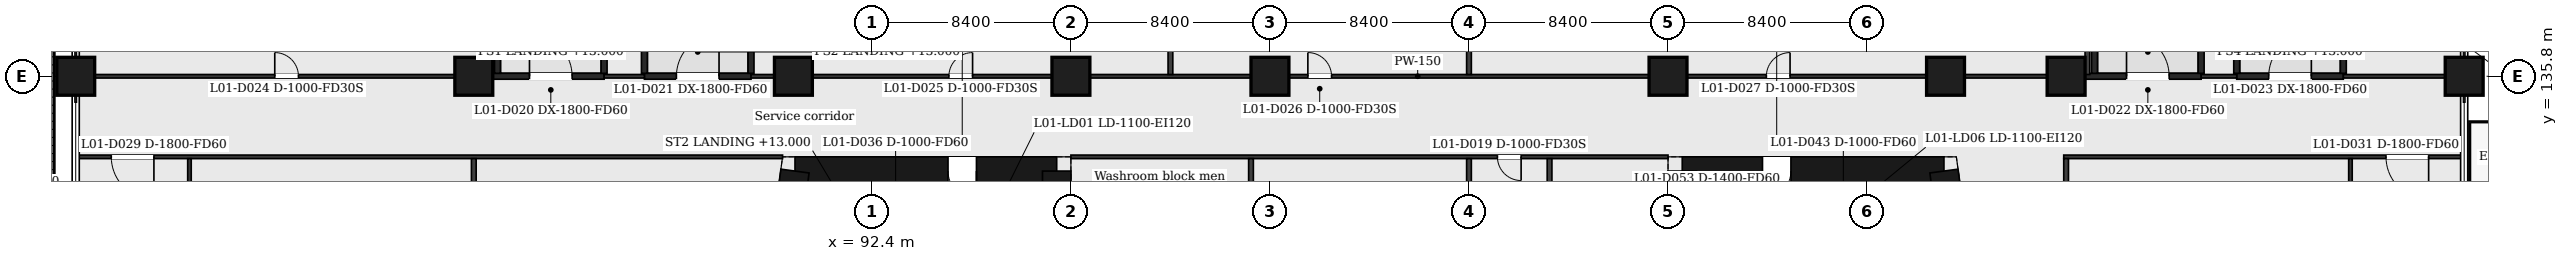
"""IFC4 building model, lengths in metres.
Left out: names, types, materials, properties, quantities, classifications, styles, units other than length and angle.
Written with IfcOpenShell. Run it as: python <this file> out.ifc"""

import sys

from ifc_helpers import new_model, si_unit, direction, frame, frame_2d, origin, origin_2d, place, context, subcontext, project, spatial, rectangle, extrude, element, fill, save


model = new_model("IFC4")
c1 = context("Model", 3, precision=1e-05, world=origin(), true_north=direction((0.0, 1.0)))
c2 = subcontext(c1, "Body", "Model", "MODEL_VIEW")
j1 = project(units=[si_unit("LENGTHUNIT", "METRE"), si_unit("PLANEANGLEUNIT", "RADIAN")], contexts=[c1])
p1 = place(None, origin())
s1 = spatial("IfcSite", under=j1, at=p1, CompositionType="ELEMENT")
p2 = place(p1, origin())
s2 = spatial("IfcBuilding", under=s1, at=p2, CompositionType="ELEMENT")
p3 = place(p2, frame((0.0, 0.0, 9.0)))
s3 = spatial("IfcBuildingStorey", under=s2, at=p3, CompositionType="ELEMENT", Elevation=9.0)
p4 = place(p3, frame((89.156, 131.8, 0.0), z_axis=(0.0, 0.0, 1.0), x_axis=(1.0, 0.0, 0.0)))
e1 = element("IfcWall", 1, at=p4, inside=s3, PredefinedType="SHEAR", context=c2, shape_type="SweptSolid", body=[
    extrude(rectangle(XDim=11.044, YDim=1.2, at=frame_2d((5.522, 0.0))), origin(), (0.0, 0.0, 1.0), 8.0),
])
p5 = place(p4, frame((6.458, 0.0, 0.0)))
e2 = element("IfcOpeningElement", 2, at=p5, cuts=e1, PredefinedType="OPENING", context=c2, shape_type="SweptSolid", body=[
    extrude(rectangle(XDim=1.2, YDim=2.1, at=frame_2d((0.6, 1.05))), frame((0.0, 0.61, 0.0), z_axis=(0.0, -1.0, 0.0), x_axis=(1.0, 0.0, 0.0)), (0.0, 0.0, 1.0), 1.22),
])
p6 = place(p3, frame((100.2, 131.8, 0.0), z_axis=(0.0, 0.0, 1.0), x_axis=(0.0, -1.0, 0.0)))
e3 = element("IfcWall", 3, at=p6, inside=s3, PredefinedType="SHEAR", context=c2, shape_type="SweptSolid", body=[
    extrude(rectangle(XDim=20.8, YDim=1.2, at=frame_2d((10.4, 0.0))), origin(), (0.0, 0.0, 1.0), 8.0),
])
p7 = place(p6, frame((7.65, 0.0, 0.0)))
e4 = element("IfcOpeningElement", 4, at=p7, cuts=e3, PredefinedType="OPENING", context=c2, shape_type="SweptSolid", body=[
    extrude(rectangle(XDim=1.4, YDim=2.1, at=frame_2d((0.7, 1.05))), frame((0.0, 0.61, 0.0), z_axis=(0.0, -1.0, 0.0), x_axis=(1.0, 0.0, 0.0)), (0.0, 0.0, 1.0), 1.22),
])
p8 = place(p3, frame((86.355, 111.0, 0.0), z_axis=(0.0, 0.0, 1.0), x_axis=(0.133413989637, 0.99106039542, 0.0)))
e5 = element("IfcWall", 5, at=p8, inside=s3, PredefinedType="SHEAR", context=c2, shape_type="SweptSolid", body=[
    extrude(rectangle(XDim=20.988, YDim=1.2, at=frame_2d((10.494, 0.0))), origin(), (0.0, 0.0, 1.0), 8.0),
])
p9 = place(p3, frame((126.6, 131.8, 0.0), z_axis=(0.0, 0.0, 1.0), x_axis=(1.0, 0.0, 0.0)))
e6 = element("IfcWall", 6, at=p9, inside=s3, PredefinedType="SHEAR", context=c2, shape_type="SweptSolid", body=[
    extrude(rectangle(XDim=11.044, YDim=1.2, at=frame_2d((5.522, 0.0))), origin(), (0.0, 0.0, 1.0), 8.0),
])
p10 = place(p9, frame((3.386, 0.0, 0.0)))
e7 = element("IfcOpeningElement", 7, at=p10, cuts=e6, PredefinedType="OPENING", context=c2, shape_type="SweptSolid", body=[
    extrude(rectangle(XDim=1.2, YDim=2.1, at=frame_2d((0.6, 1.05))), frame((0.0, 0.61, 0.0), z_axis=(0.0, -1.0, 0.0), x_axis=(1.0, 0.0, 0.0)), (0.0, 0.0, 1.0), 1.22),
])
p11 = place(p3, frame((137.645, 131.8, 0.0), z_axis=(0.0, 0.0, 1.0), x_axis=(0.133413989637, -0.99106039542, 0.0)))
e8 = element("IfcWall", 8, at=p11, inside=s3, PredefinedType="SHEAR", context=c2, shape_type="SweptSolid", body=[
    extrude(rectangle(XDim=20.988, YDim=1.2, at=frame_2d((10.494, 0.0))), origin(), (0.0, 0.0, 1.0), 8.0),
])
p12 = place(p3, frame((126.6, 111.0, 0.0), z_axis=(0.0, 0.0, 1.0), x_axis=(0.0, 1.0, 0.0)))
e9 = element("IfcWall", 9, at=p12, inside=s3, PredefinedType="SHEAR", context=c2, shape_type="SweptSolid", body=[
    extrude(rectangle(XDim=20.8, YDim=1.2, at=frame_2d((10.4, 0.0))), origin(), (0.0, 0.0, 1.0), 8.0),
])
p13 = place(p12, frame((11.75, 0.0, 0.0)))
e10 = element("IfcOpeningElement", 10, at=p13, cuts=e9, PredefinedType="OPENING", context=c2, shape_type="SweptSolid", body=[
    extrude(rectangle(XDim=1.4, YDim=2.1, at=frame_2d((0.7, 1.05))), frame((0.0, 0.61, 0.0), z_axis=(0.0, -1.0, 0.0), x_axis=(1.0, 0.0, 0.0)), (0.0, 0.0, 1.0), 1.22),
])
for number, where, z_axis, x_axis in (
    (11, (58.8, 135.8, 0.0), (0.0, 0.0, 1.0), (1.0, 0.0, 0.0)),
    (12, (75.6, 135.8, 0.0), (0.0, 0.0, 1.0), (1.0, 0.0, 0.0)),
    (13, (89.088, 135.8, 0.0), (0.0, 0.0, 1.0), (1.0, 0.0, 0.0)),
    (14, (100.8, 135.8, 0.0), (0.0, 0.0, 1.0), (1.0, 0.0, 0.0)),
    (15, (109.2, 135.8, 0.0), (0.0, 0.0, 1.0), (1.0, 0.0, 0.0)),
    (16, (126.0, 135.8, 0.0), (0.0, 0.0, 1.0), (1.0, 0.0, 0.0)),
    (17, (137.711, 135.8, 0.0), (0.0, 0.0, 1.0), (1.0, 0.0, 0.0)),
    (18, (142.8, 135.8, 0.0), (0.0, 0.0, 1.0), (1.0, 0.0, 0.0)),
    (19, (159.6, 135.8, 0.0), (0.0, 0.0, 1.0), (1.0, 0.0, 0.0)),
):
    element("IfcColumn", number, at=place(p3, frame(where, z_axis=z_axis, x_axis=x_axis)), inside=s3, PredefinedType="COLUMN", context=c2, shape_type="SweptSolid", body=[
        extrude(rectangle(XDim=1.6, YDim=1.6, at=origin_2d()), origin(), (0.0, 0.0, 1.0), 8.0),
    ])
p14 = place(p3, frame((58.85, 132.4, 0.0), z_axis=(0.0, 0.0, 1.0), x_axis=(1.0, 0.0, 0.0)))
e20 = element("IfcWall", 20, at=p14, inside=s3, PredefinedType="PARTITIONING", context=c2, shape_type="SweptSolid", body=[
    extrude(rectangle(XDim=29.781, YDim=0.15, at=frame_2d((14.891, 0.0))), origin(), (0.0, 0.0, 1.0), 7.5),
])
p15 = place(p14, frame((1.45, 0.0, 0.0)))
e21 = element("IfcOpeningElement", 21, at=p15, cuts=e20, PredefinedType="OPENING", context=c2, shape_type="SweptSolid", body=[
    extrude(rectangle(XDim=1.8, YDim=2.1, at=frame_2d((0.9, 1.05))), frame((0.0, 0.085, 0.0), z_axis=(0.0, -1.0, 0.0), x_axis=(1.0, 0.0, 0.0)), (0.0, 0.0, 1.0), 0.17),
])
p16 = place(p3, frame((100.8, 132.4, 0.0), z_axis=(0.0, 0.0, 1.0), x_axis=(1.0, 0.0, 0.0)))
e22 = element("IfcWall", 22, at=p16, inside=s3, PredefinedType="PARTITIONING", context=c2, shape_type="SweptSolid", body=[
    extrude(rectangle(XDim=25.2, YDim=0.15, at=frame_2d((12.6, 0.0))), origin(), (0.0, 0.0, 1.0), 7.5),
])
p17 = place(p16, frame((18.0, 0.0, 0.0)))
e23 = element("IfcOpeningElement", 23, at=p17, cuts=e22, PredefinedType="OPENING", context=c2, shape_type="SweptSolid", body=[
    extrude(rectangle(XDim=1.0, YDim=2.1, at=frame_2d((0.5, 1.05))), frame((0.0, 0.085, 0.0), z_axis=(0.0, -1.0, 0.0), x_axis=(1.0, 0.0, 0.0)), (0.0, 0.0, 1.0), 0.17),
])
p18 = place(p3, frame((142.7, 132.4, 0.0), z_axis=(0.0, 0.0, 1.0), x_axis=(1.0, 0.0, 0.0)))
e24 = element("IfcWall", 24, at=p18, inside=s3, PredefinedType="PARTITIONING", context=c2, shape_type="SweptSolid", body=[
    extrude(rectangle(XDim=16.85, YDim=0.15, at=frame_2d((8.425, 0.0))), origin(), (0.0, 0.0, 1.0), 7.5),
])
p19 = place(p18, frame((13.6, 0.0, 0.0)))
e25 = element("IfcOpeningElement", 25, at=p19, cuts=e24, PredefinedType="OPENING", context=c2, shape_type="SweptSolid", body=[
    extrude(rectangle(XDim=1.8, YDim=2.1, at=frame_2d((0.9, 1.05))), frame((0.0, 0.085, 0.0), z_axis=(0.0, -1.0, 0.0), x_axis=(1.0, 0.0, 0.0)), (0.0, 0.0, 1.0), 0.17),
])
p20 = place(p3, frame((76.37, 135.8, 0.0), z_axis=(0.0, 0.0, 1.0), x_axis=(1.0, 0.0, 0.0)))
e26 = element("IfcWall", 26, at=p20, inside=s3, PredefinedType="PARTITIONING", context=c2, shape_type="SweptSolid", body=[
    extrude(rectangle(XDim=4.73, YDim=0.25, at=frame_2d((2.365, 0.0))), origin(), (0.0, 0.0, 1.0), 7.5),
])
p21 = place(p20, frame((1.58, 0.0, 0.0)))
e27 = element("IfcOpeningElement", 27, at=p21, cuts=e26, PredefinedType="OPENING", context=c2, shape_type="SweptSolid", body=[
    extrude(rectangle(XDim=1.8, YDim=2.1, at=frame_2d((0.9, 1.05))), frame((0.0, 0.135, 0.0), z_axis=(0.0, -1.0, 0.0), x_axis=(1.0, 0.0, 0.0)), (0.0, 0.0, 1.0), 0.27),
])
p22 = place(p3, frame((82.8, 135.8, 0.0), z_axis=(0.0, 0.0, 1.0), x_axis=(1.0, 0.0, 0.0)))
e28 = element("IfcWall", 28, at=p22, inside=s3, PredefinedType="PARTITIONING", context=c2, shape_type="SweptSolid", body=[
    extrude(rectangle(XDim=4.5, YDim=0.25, at=frame_2d((2.25, 0.0))), origin(), (0.0, 0.0, 1.0), 7.5),
])
p23 = place(p22, frame((1.35, 0.0, 0.0)))
e29 = element("IfcOpeningElement", 29, at=p23, cuts=e28, PredefinedType="OPENING", context=c2, shape_type="SweptSolid", body=[
    extrude(rectangle(XDim=1.8, YDim=2.1, at=frame_2d((0.9, 1.05))), frame((0.0, 0.135, 0.0), z_axis=(0.0, -1.0, 0.0), x_axis=(1.0, 0.0, 0.0)), (0.0, 0.0, 1.0), 0.27),
])
p24 = place(p3, frame((143.57, 135.8, 0.0), z_axis=(0.0, 0.0, 1.0), x_axis=(1.0, 0.0, 0.0)))
e30 = element("IfcWall", 30, at=p24, inside=s3, PredefinedType="PARTITIONING", context=c2, shape_type="SweptSolid", body=[
    extrude(rectangle(XDim=4.93, YDim=0.25, at=frame_2d((2.465, 0.0))), origin(), (0.0, 0.0, 1.0), 7.5),
])
p25 = place(p24, frame((1.78, 0.0, 0.0)))
e31 = element("IfcOpeningElement", 31, at=p25, cuts=e30, PredefinedType="OPENING", context=c2, shape_type="SweptSolid", body=[
    extrude(rectangle(XDim=1.8, YDim=2.1, at=frame_2d((0.9, 1.05))), frame((0.0, 0.135, 0.0), z_axis=(0.0, -1.0, 0.0), x_axis=(1.0, 0.0, 0.0)), (0.0, 0.0, 1.0), 0.27),
])
p26 = place(p3, frame((150.0, 135.8, 0.0), z_axis=(0.0, 0.0, 1.0), x_axis=(1.0, 0.0, 0.0)))
e32 = element("IfcWall", 32, at=p26, inside=s3, PredefinedType="PARTITIONING", context=c2, shape_type="SweptSolid", body=[
    extrude(rectangle(XDim=4.5, YDim=0.25, at=frame_2d((2.25, 0.0))), origin(), (0.0, 0.0, 1.0), 7.5),
])
p27 = place(p26, frame((1.35, 0.0, 0.0)))
e33 = element("IfcOpeningElement", 33, at=p27, cuts=e32, PredefinedType="OPENING", context=c2, shape_type="SweptSolid", body=[
    extrude(rectangle(XDim=1.8, YDim=2.1, at=frame_2d((0.9, 1.05))), frame((0.0, 0.135, 0.0), z_axis=(0.0, -1.0, 0.0), x_axis=(1.0, 0.0, 0.0)), (0.0, 0.0, 1.0), 0.27),
])
p28 = place(p3, frame((58.85, 135.8, 0.0), z_axis=(0.0, 0.0, 1.0), x_axis=(1.0, 0.0, 0.0)))
e34 = element("IfcWall", 34, at=p28, inside=s3, PredefinedType="PARTITIONING", context=c2, shape_type="SweptSolid", body=[
    extrude(rectangle(XDim=17.52, YDim=0.15, at=frame_2d((8.76, 0.0))), origin(), (0.0, 0.0, 1.0), 7.5),
])
p29 = place(p28, frame((8.35, 0.0, 0.0)))
e35 = element("IfcOpeningElement", 35, at=p29, cuts=e34, PredefinedType="OPENING", context=c2, shape_type="SweptSolid", body=[
    extrude(rectangle(XDim=1.0, YDim=2.1, at=frame_2d((0.5, 1.05))), frame((0.0, 0.085, 0.0), z_axis=(0.0, -1.0, 0.0), x_axis=(1.0, 0.0, 0.0)), (0.0, 0.0, 1.0), 0.17),
])
p30 = place(p3, frame((81.1, 135.8, 0.0), z_axis=(0.0, 0.0, 1.0), x_axis=(1.0, 0.0, 0.0)))
e36 = element("IfcWall", 36, at=p30, inside=s3, PredefinedType="PARTITIONING", context=c2, shape_type="SweptSolid", body=[
    extrude(rectangle(XDim=1.7, YDim=0.15, at=frame_2d((0.85, 0.0))), origin(), (0.0, 0.0, 1.0), 7.5),
])
p31 = place(p3, frame((87.3, 135.8, 0.0), z_axis=(0.0, 0.0, 1.0), x_axis=(1.0, 0.0, 0.0)))
e37 = element("IfcWall", 37, at=p31, inside=s3, PredefinedType="PARTITIONING", context=c2, shape_type="SweptSolid", body=[
    extrude(rectangle(XDim=56.27, YDim=0.15, at=frame_2d((28.135, 0.0))), origin(), (0.0, 0.0, 1.0), 7.5),
])
p32 = place(p31, frame((8.35, 0.0, 0.0)))
e38 = element("IfcOpeningElement", 38, at=p32, cuts=e37, PredefinedType="OPENING", context=c2, shape_type="SweptSolid", body=[
    extrude(rectangle(XDim=1.0, YDim=2.1, at=frame_2d((0.5, 1.05))), frame((0.0, 0.085, 0.0), z_axis=(0.0, -1.0, 0.0), x_axis=(1.0, 0.0, 0.0)), (0.0, 0.0, 1.0), 0.17),
])
p33 = place(p31, frame((23.5, 0.0, 0.0)))
e39 = element("IfcOpeningElement", 39, at=p33, cuts=e37, PredefinedType="OPENING", context=c2, shape_type="SweptSolid", body=[
    extrude(rectangle(XDim=1.0, YDim=2.1, at=frame_2d((0.5, 1.05))), frame((0.0, 0.085, 0.0), z_axis=(0.0, -1.0, 0.0), x_axis=(1.0, 0.0, 0.0)), (0.0, 0.0, 1.0), 0.17),
])
p34 = place(p31, frame((42.85, 0.0, 0.0)))
e40 = element("IfcOpeningElement", 40, at=p34, cuts=e37, PredefinedType="OPENING", context=c2, shape_type="SweptSolid", body=[
    extrude(rectangle(XDim=1.0, YDim=2.1, at=frame_2d((0.5, 1.05))), frame((0.0, 0.085, 0.0), z_axis=(0.0, -1.0, 0.0), x_axis=(1.0, 0.0, 0.0)), (0.0, 0.0, 1.0), 0.17),
])
p35 = place(p3, frame((148.5, 135.8, 0.0), z_axis=(0.0, 0.0, 1.0), x_axis=(1.0, 0.0, 0.0)))
e41 = element("IfcWall", 41, at=p35, inside=s3, PredefinedType="PARTITIONING", context=c2, shape_type="SweptSolid", body=[
    extrude(rectangle(XDim=1.5, YDim=0.15, at=frame_2d((0.75, 0.0))), origin(), (0.0, 0.0, 1.0), 7.5),
])
p36 = place(p3, frame((154.5, 135.8, 0.0), z_axis=(0.0, 0.0, 1.0), x_axis=(1.0, 0.0, 0.0)))
e42 = element("IfcWall", 42, at=p36, inside=s3, PredefinedType="PARTITIONING", context=c2, shape_type="SweptSolid", body=[
    extrude(rectangle(XDim=5.05, YDim=0.15, at=frame_2d((2.525, 0.0))), origin(), (0.0, 0.0, 1.0), 7.5),
])
p37 = place(p3, frame((63.6, 110.475, 0.0), z_axis=(0.0, 0.0, 1.0), x_axis=(0.0, 1.0, 0.0)))
e43 = element("IfcWall", 43, at=p37, inside=s3, PredefinedType="PARTITIONING", context=c2, shape_type="SweptSolid", body=[
    extrude(rectangle(XDim=21.85, YDim=0.15, at=frame_2d((10.925, 0.0))), origin(), (0.0, 0.0, 1.0), 7.5),
])
p38 = place(p3, frame((75.6, 110.475, 0.0), z_axis=(0.0, 0.0, 1.0), x_axis=(0.0, 1.0, 0.0)))
e44 = element("IfcWall", 44, at=p38, inside=s3, PredefinedType="PARTITIONING", context=c2, shape_type="SweptSolid", body=[
    extrude(rectangle(XDim=21.85, YDim=0.2, at=frame_2d((10.925, 0.0))), origin(), (0.0, 0.0, 1.0), 7.5),
])
for number, where, z_axis, x_axis in (
    (45, (76.6, 135.925, 0.0), (0.0, 0.0, 1.0), (0.0, 1.0, 0.0)),
    (46, (81.1, 135.925, 0.0), (0.0, 0.0, 1.0), (0.0, 1.0, 0.0)),
    (47, (82.8, 135.925, 0.0), (0.0, 0.0, 1.0), (0.0, 1.0, 0.0)),
    (48, (87.3, 135.925, 0.0), (0.0, 0.0, 1.0), (0.0, 1.0, 0.0)),
):
    element("IfcWall", number, at=place(p3, frame(where, z_axis=z_axis, x_axis=x_axis)), inside=s3, PredefinedType="PARTITIONING", context=c2, shape_type="SweptSolid", body=[
        extrude(rectangle(XDim=8.825, YDim=0.25, at=frame_2d((4.413, 0.0))), origin(), (0.0, 0.0, 1.0), 7.5),
    ])
p39 = place(p3, frame((105.0, 135.875, 0.0), z_axis=(0.0, 0.0, 1.0), x_axis=(0.0, 1.0, 0.0)))
e49 = element("IfcWall", 49, at=p39, inside=s3, PredefinedType="PARTITIONING", context=c2, shape_type="SweptSolid", body=[
    extrude(rectangle(XDim=8.875, YDim=0.2, at=frame_2d((4.438, 0.0))), origin(), (0.0, 0.0, 1.0), 7.5),
])
for number, where, z_axis, x_axis in (
    (50, (108.4, 122.975, 0.0), (0.0, 0.0, 1.0), (0.0, 1.0, 0.0)),
    (51, (117.6, 122.975, 0.0), (0.0, 0.0, 1.0), (0.0, 1.0, 0.0)),
):
    element("IfcWall", number, at=place(p3, frame(where, z_axis=z_axis, x_axis=x_axis)), inside=s3, PredefinedType="PARTITIONING", context=c2, shape_type="SweptSolid", body=[
        extrude(rectangle(XDim=9.35, YDim=0.2, at=frame_2d((4.675, 0.0))), origin(), (0.0, 0.0, 1.0), 7.5),
    ])
p40 = place(p3, frame((117.6, 135.875, 0.0), z_axis=(0.0, 0.0, 1.0), x_axis=(0.0, 1.0, 0.0)))
e52 = element("IfcWall", 52, at=p40, inside=s3, PredefinedType="PARTITIONING", context=c2, shape_type="SweptSolid", body=[
    extrude(rectangle(XDim=8.875, YDim=0.2, at=frame_2d((4.438, 0.0))), origin(), (0.0, 0.0, 1.0), 7.5),
])
p41 = place(p3, frame((121.0, 122.975, 0.0), z_axis=(0.0, 0.0, 1.0), x_axis=(0.0, 1.0, 0.0)))
e53 = element("IfcWall", 53, at=p41, inside=s3, PredefinedType="PARTITIONING", context=c2, shape_type="SweptSolid", body=[
    extrude(rectangle(XDim=9.35, YDim=0.2, at=frame_2d((4.675, 0.0))), origin(), (0.0, 0.0, 1.0), 7.5),
])
p42 = place(p3, frame((142.8, 110.475, 0.0), z_axis=(0.0, 0.0, 1.0), x_axis=(0.0, 1.0, 0.0)))
e54 = element("IfcWall", 54, at=p42, inside=s3, PredefinedType="PARTITIONING", context=c2, shape_type="SweptSolid", body=[
    extrude(rectangle(XDim=21.85, YDim=0.2, at=frame_2d((10.925, 0.0))), origin(), (0.0, 0.0, 1.0), 7.5),
])
p43 = place(p3, frame((143.7, 135.875, 0.0), z_axis=(0.0, 0.0, 1.0), x_axis=(0.0, 1.0, 0.0)))
e55 = element("IfcWall", 55, at=p43, inside=s3, PredefinedType="PARTITIONING", context=c2, shape_type="SweptSolid", body=[
    extrude(rectangle(XDim=8.875, YDim=0.2, at=frame_2d((4.438, 0.0))), origin(), (0.0, 0.0, 1.0), 7.5),
])
for number, where, z_axis, x_axis in (
    (56, (144.0, 135.925, 0.0), (0.0, 0.0, 1.0), (0.0, 1.0, 0.0)),
    (57, (148.5, 135.925, 0.0), (0.0, 0.0, 1.0), (0.0, 1.0, 0.0)),
    (58, (150.0, 135.925, 0.0), (0.0, 0.0, 1.0), (0.0, 1.0, 0.0)),
    (59, (154.5, 135.925, 0.0), (0.0, 0.0, 1.0), (0.0, 1.0, 0.0)),
):
    element("IfcWall", number, at=place(p3, frame(where, z_axis=z_axis, x_axis=x_axis)), inside=s3, PredefinedType="PARTITIONING", context=c2, shape_type="SweptSolid", body=[
        extrude(rectangle(XDim=8.825, YDim=0.25, at=frame_2d((4.413, 0.0))), origin(), (0.0, 0.0, 1.0), 7.5),
    ])
p44 = place(p3, frame((154.8, 110.475, 0.0), z_axis=(0.0, 0.0, 1.0), x_axis=(0.0, 1.0, 0.0)))
e60 = element("IfcWall", 60, at=p44, inside=s3, PredefinedType="PARTITIONING", context=c2, shape_type="SweptSolid", body=[
    extrude(rectangle(XDim=21.85, YDim=0.15, at=frame_2d((10.925, 0.0))), origin(), (0.0, 0.0, 1.0), 7.5),
])
p45 = place(p17, origin())
e61 = element("IfcDoor", 61, at=p45, inside=s3, OperationType="SINGLE_SWING_RIGHT", PredefinedType="DOOR", context=c2, shape_type="SweptSolid", body=[
    extrude(rectangle(XDim=1.0, YDim=2.1, at=frame_2d((0.5, 1.05))), frame((0.0, 0.025, 0.0), z_axis=(0.0, -1.0, 0.0), x_axis=(1.0, 0.0, 0.0)), (0.0, 0.0, 1.0), 0.05),
])
fill(e23, e61)
p46 = place(p21, origin())
e62 = element("IfcDoor", 62, at=p46, inside=s3, OperationType="SINGLE_SWING_LEFT", PredefinedType="DOOR", context=c2, shape_type="SweptSolid", body=[
    extrude(rectangle(XDim=1.8, YDim=2.1, at=frame_2d((0.9, 1.05))), frame((0.0, 0.025, 0.0), z_axis=(0.0, -1.0, 0.0), x_axis=(1.0, 0.0, 0.0)), (0.0, 0.0, 1.0), 0.05),
])
fill(e27, e62)
p47 = place(p23, origin())
e63 = element("IfcDoor", 63, at=p47, inside=s3, OperationType="SINGLE_SWING_RIGHT", PredefinedType="DOOR", context=c2, shape_type="SweptSolid", body=[
    extrude(rectangle(XDim=1.8, YDim=2.1, at=frame_2d((0.9, 1.05))), frame((0.0, 0.025, 0.0), z_axis=(0.0, -1.0, 0.0), x_axis=(1.0, 0.0, 0.0)), (0.0, 0.0, 1.0), 0.05),
])
fill(e29, e63)
p48 = place(p25, origin())
e64 = element("IfcDoor", 64, at=p48, inside=s3, OperationType="SINGLE_SWING_LEFT", PredefinedType="DOOR", context=c2, shape_type="SweptSolid", body=[
    extrude(rectangle(XDim=1.8, YDim=2.1, at=frame_2d((0.9, 1.05))), frame((0.0, 0.025, 0.0), z_axis=(0.0, -1.0, 0.0), x_axis=(1.0, 0.0, 0.0)), (0.0, 0.0, 1.0), 0.05),
])
fill(e31, e64)
p49 = place(p27, origin())
e65 = element("IfcDoor", 65, at=p49, inside=s3, OperationType="SINGLE_SWING_RIGHT", PredefinedType="DOOR", context=c2, shape_type="SweptSolid", body=[
    extrude(rectangle(XDim=1.8, YDim=2.1, at=frame_2d((0.9, 1.05))), frame((0.0, 0.025, 0.0), z_axis=(0.0, -1.0, 0.0), x_axis=(1.0, 0.0, 0.0)), (0.0, 0.0, 1.0), 0.05),
])
fill(e33, e65)
p50 = place(p29, origin())
e66 = element("IfcDoor", 66, at=p50, inside=s3, OperationType="SINGLE_SWING_LEFT", PredefinedType="DOOR", context=c2, shape_type="SweptSolid", body=[
    extrude(rectangle(XDim=1.0, YDim=2.1, at=frame_2d((0.5, 1.05))), frame((0.0, 0.025, 0.0), z_axis=(0.0, -1.0, 0.0), x_axis=(1.0, 0.0, 0.0)), (0.0, 0.0, 1.0), 0.05),
])
fill(e35, e66)
p51 = place(p32, origin())
e67 = element("IfcDoor", 67, at=p51, inside=s3, OperationType="SINGLE_SWING_RIGHT", PredefinedType="DOOR", context=c2, shape_type="SweptSolid", body=[
    extrude(rectangle(XDim=1.0, YDim=2.1, at=frame_2d((0.5, 1.05))), frame((0.0, 0.025, 0.0), z_axis=(0.0, -1.0, 0.0), x_axis=(1.0, 0.0, 0.0)), (0.0, 0.0, 1.0), 0.05),
])
fill(e38, e67)
p52 = place(p33, origin())
e68 = element("IfcDoor", 68, at=p52, inside=s3, OperationType="SINGLE_SWING_LEFT", PredefinedType="DOOR", context=c2, shape_type="SweptSolid", body=[
    extrude(rectangle(XDim=1.0, YDim=2.1, at=frame_2d((0.5, 1.05))), frame((0.0, 0.025, 0.0), z_axis=(0.0, -1.0, 0.0), x_axis=(1.0, 0.0, 0.0)), (0.0, 0.0, 1.0), 0.05),
])
fill(e39, e68)
p53 = place(p34, origin())
e69 = element("IfcDoor", 69, at=p53, inside=s3, OperationType="SINGLE_SWING_RIGHT", PredefinedType="DOOR", context=c2, shape_type="SweptSolid", body=[
    extrude(rectangle(XDim=1.0, YDim=2.1, at=frame_2d((0.5, 1.05))), frame((0.0, 0.025, 0.0), z_axis=(0.0, -1.0, 0.0), x_axis=(1.0, 0.0, 0.0)), (0.0, 0.0, 1.0), 0.05),
])
fill(e40, e69)
p54 = place(p15, origin())
e70 = element("IfcDoor", 70, at=p54, inside=s3, OperationType="SINGLE_SWING_RIGHT", PredefinedType="DOOR", context=c2, shape_type="SweptSolid", body=[
    extrude(rectangle(XDim=1.8, YDim=2.1, at=frame_2d((0.9, 1.05))), frame((0.0, 0.025, 0.0), z_axis=(0.0, -1.0, 0.0), x_axis=(1.0, 0.0, 0.0)), (0.0, 0.0, 1.0), 0.05),
])
fill(e21, e70)
p55 = place(p19, origin())
e71 = element("IfcDoor", 71, at=p55, inside=s3, OperationType="SINGLE_SWING_RIGHT", PredefinedType="DOOR", context=c2, shape_type="SweptSolid", body=[
    extrude(rectangle(XDim=1.8, YDim=2.1, at=frame_2d((0.9, 1.05))), frame((0.0, 0.025, 0.0), z_axis=(0.0, -1.0, 0.0), x_axis=(1.0, 0.0, 0.0)), (0.0, 0.0, 1.0), 0.05),
])
fill(e25, e71)
p56 = place(p5, origin())
e72 = element("IfcDoor", 72, at=p56, inside=s3, OperationType="SINGLE_SWING_RIGHT", PredefinedType="DOOR", context=c2, shape_type="SweptSolid", body=[
    extrude(rectangle(XDim=1.2, YDim=2.1, at=frame_2d((0.6, 1.05))), frame((0.0, 0.025, 0.0), z_axis=(0.0, -1.0, 0.0), x_axis=(1.0, 0.0, 0.0)), (0.0, 0.0, 1.0), 0.05),
])
fill(e2, e72)
p57 = place(p10, origin())
e73 = element("IfcDoor", 73, at=p57, inside=s3, OperationType="SINGLE_SWING_LEFT", PredefinedType="DOOR", context=c2, shape_type="SweptSolid", body=[
    extrude(rectangle(XDim=1.2, YDim=2.1, at=frame_2d((0.6, 1.05))), frame((0.0, 0.025, 0.0), z_axis=(0.0, -1.0, 0.0), x_axis=(1.0, 0.0, 0.0)), (0.0, 0.0, 1.0), 0.05),
])
fill(e7, e73)
save(model, sys.argv[1])
